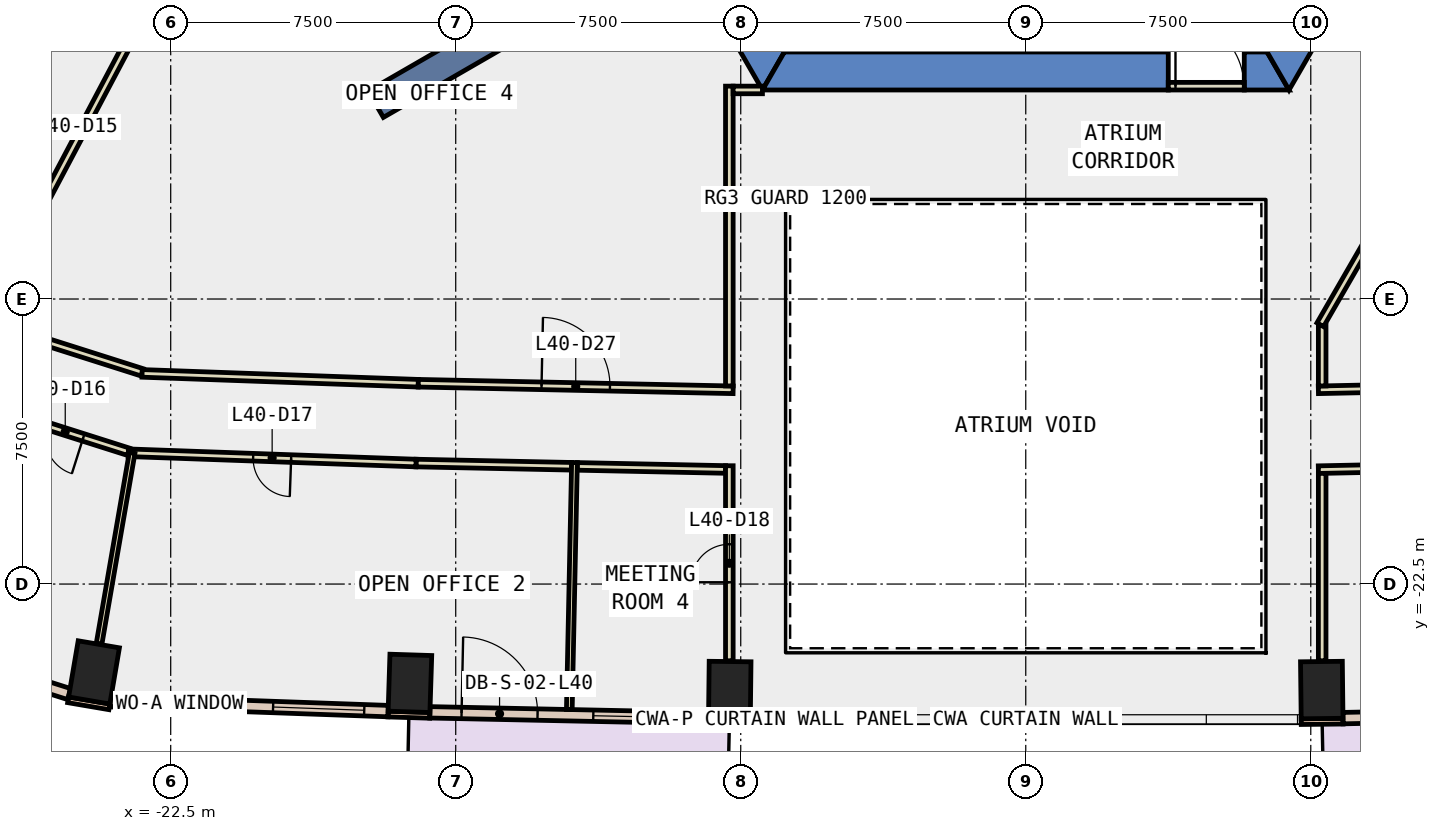
"""IFC4 building model, lengths in metres.
Left out: names, types, materials, properties, quantities, classifications, styles, units other than length and angle.
Written with IfcOpenShell. Run it as: python <this file> out.ifc"""

import sys

from ifc_helpers import new_model, si_unit, direction, frame, frame_2d, origin, origin_2d, place, context, subcontext, project, spatial, polyline, rectangle, outline, extrude, element, fill, save


model = new_model("IFC4")
c1 = context("Model", 3, precision=1e-05, world=origin(), true_north=direction((0.0, 1.0)))
c2 = subcontext(c1, "Body", "Model", "MODEL_VIEW")
j1 = project(units=[si_unit("LENGTHUNIT", "METRE"), si_unit("PLANEANGLEUNIT", "RADIAN")], contexts=[c1])
p1 = place(None, origin())
s1 = spatial("IfcSite", under=j1, at=p1, CompositionType="ELEMENT")
p2 = place(p1, origin())
s2 = spatial("IfcBuilding", under=s1, at=p2, CompositionType="ELEMENT")
p3 = place(p2, frame((0.0, 0.0, 180.2)))
s3 = spatial("IfcBuildingStorey", under=s2, at=p3, CompositionType="ELEMENT", Elevation=180.2)
for number, where, z_axis, x_axis in (
    (1, (-24.518, -24.825, -0.4), (0.0, 0.0, 1.0), (-0.986, 0.168, 0.0)),
    (2, (-16.205, -25.113, -0.4), (0.0, 0.0, 1.0), (-0.999, 0.032, 0.0)),
    (3, (-7.789, -25.289, -0.4), (0.0, 0.0, 1.0), (-1.0, 0.012, 0.0)),
    (4, (7.789, -25.289, -0.4), (0.0, 0.0, 1.0), (1.0, 0.012, 0.0)),
):
    element("IfcColumn", number, at=place(p3, frame(where, z_axis=z_axis, x_axis=x_axis)), inside=s3, PredefinedType="COLUMN", context=c2, shape_type="SweptSolid", body=[
        extrude(rectangle(XDim=1.1, YDim=1.5, at=origin_2d()), origin(), (0.0, 0.0, 1.0), 4.0),
    ])
p4 = place(p3, frame((0.0, 0.0, -0.4)))
e5 = element("IfcWall", 5, at=p4, inside=s3, PredefinedType="SHEAR", context=c2, shape_type="SweptSolid", body=[
    extrude(outline(polyline([(-13.856, 2.5), (-6.928, -9.5), (-6.351, -8.5), (-12.702, 2.5), (-13.856, 2.5)])), origin(), (0.0, 0.0, 1.0), 4.0),
])
p5 = place(p3, frame((0.0, 0.0, -0.4)))
e6 = element("IfcWall", 6, at=p5, inside=s3, PredefinedType="SHEAR", context=c2, shape_type="SweptSolid", body=[
    extrude(outline(polyline([(3.75, -9.5), (3.75, -8.5), (-6.351, -8.5), (-6.928, -9.5), (3.75, -9.5)])), origin(), (0.0, 0.0, 1.0), 4.0),
])
p6 = place(p3, frame((0.0, 0.0, -0.4)))
e7 = element("IfcWall", 7, at=p6, inside=s3, PredefinedType="SHEAR", context=c2, shape_type="SweptSolid", body=[
    extrude(outline(polyline([(5.75, -8.5), (5.75, -9.5), (6.928, -9.5), (6.351, -8.5), (5.75, -8.5)])), origin(), (0.0, 0.0, 1.0), 4.0),
])
p7 = place(p3, frame((0.0, 0.0, -0.4)))
e8 = element("IfcWall", 8, at=p7, inside=s3, PredefinedType="SHEAR", context=c2, shape_type="SweptSolid", body=[
    extrude(outline(polyline([(8.117, -7.44), (7.252, -6.94), (6.351, -8.5), (6.928, -9.5), (8.117, -7.44)])), origin(), (0.0, 0.0, 1.0), 4.0),
])
p8 = place(p3, frame((-9.31, -5.375, -0.4), z_axis=(0.0, 0.0, 1.0), x_axis=(-0.866017533419, -0.500013631625, 0.0)))
e9 = element("IfcWall", 9, at=p8, inside=s3, PredefinedType="SHEAR", context=c2, shape_type="SweptSolid", body=[
    extrude(rectangle(XDim=9.0, YDim=0.8, at=frame_2d((4.5, 0.0))), origin(), (0.0, 0.0, 1.0), 4.0),
])
p9 = place(p3, frame((-25.199, -25.546, 0.0), z_axis=(0.0, 0.0, 1.0), x_axis=(0.985763338892, -0.168138751323, 0.0)))
e10 = element("IfcWall", 10, at=p9, inside=s3, PredefinedType="STANDARD", context=c2, shape_type="SweptSolid", body=[
    extrude(rectangle(XDim=1.101, YDim=0.15, at=frame_2d((0.55, 0.0))), origin(), (0.0, 0.0, 1.0), 3.6),
])
p10 = place(p3, frame((-16.781, -25.921, 0.0), z_axis=(0.0, 0.0, 1.0), x_axis=(0.99951682968, -0.031082264806, 0.0)))
e11 = element("IfcWall", 11, at=p10, inside=s3, PredefinedType="STANDARD", context=c2, shape_type="SweptSolid", body=[
    extrude(rectangle(XDim=1.1, YDim=0.15, at=frame_2d((0.55, 0.0))), origin(), (0.0, 0.0, 1.0), 3.6),
])
for number, where, z_axis, x_axis in (
    (12, (-8.349, -26.108, 0.0), (0.0, 0.0, 1.0), (1.0, -0.011, 0.0)),
    (13, (7.249, -26.12, 0.0), (0.0, 0.0, 1.0), (1.0, 0.011, 0.0)),
):
    element("IfcWall", number, at=place(p3, frame(where, z_axis=z_axis, x_axis=x_axis)), inside=s3, PredefinedType="STANDARD", context=c2, shape_type="SweptSolid", body=[
        extrude(rectangle(XDim=1.1, YDim=0.15, at=frame_2d((0.55, 0.0))), origin(), (0.0, 0.0, 1.0), 3.6),
    ])
p11 = place(p3, frame((-24.09, -25.583, 0.0), z_axis=(0.0, 0.0, 1.0), x_axis=(0.999368368263, -0.035536805082, 0.0)))
e14 = element("IfcWall", 14, at=p11, inside=s3, PredefinedType="STANDARD", context=c2, shape_type="SweptSolid", body=[
    extrude(rectangle(XDim=7.317, YDim=0.3, at=frame_2d((3.658, 0.0))), origin(), (0.0, 0.0, 1.0), 3.6),
])
p12 = place(p11, frame((0.629, 0.0, 0.9)))
e15 = element("IfcOpeningElement", 15, at=p12, cuts=e14, PredefinedType="OPENING", context=c2, shape_type="SweptSolid", body=[
    extrude(rectangle(XDim=2.4, YDim=2.6, at=frame_2d((1.2, 1.3))), frame((0.0, 0.16, 0.0), z_axis=(0.0, -1.0, 0.0), x_axis=(1.0, 0.0, 0.0)), (0.0, 0.0, 1.0), 0.32),
])
p13 = place(p11, frame((4.287, 0.0, 0.9)))
e16 = element("IfcOpeningElement", 16, at=p13, cuts=e14, PredefinedType="OPENING", context=c2, shape_type="SweptSolid", body=[
    extrude(rectangle(XDim=2.4, YDim=2.6, at=frame_2d((1.2, 1.3))), frame((0.0, 0.16, 0.0), z_axis=(0.0, -1.0, 0.0), x_axis=(1.0, 0.0, 0.0)), (0.0, 0.0, 1.0), 0.32),
])
p14 = place(p3, frame((-15.68, -25.875, 0.0), z_axis=(0.0, 0.0, 1.0), x_axis=(0.999782189413, -0.020870403275, 0.0)))
e17 = element("IfcWall", 17, at=p14, inside=s3, PredefinedType="STANDARD", context=c2, shape_type="SweptSolid", body=[
    extrude(rectangle(XDim=7.335, YDim=0.3, at=frame_2d((3.667, 0.0))), origin(), (0.0, 0.0, 1.0), 3.6),
])
p15 = place(p14, frame((0.834, 0.0, 0.0)))
e18 = element("IfcOpeningElement", 18, at=p15, cuts=e17, PredefinedType="OPENING", context=c2, shape_type="SweptSolid", body=[
    extrude(rectangle(XDim=2.0, YDim=2.4, at=frame_2d((1.0, 1.2))), frame((0.0, 0.16, 0.0), z_axis=(0.0, -1.0, 0.0), x_axis=(1.0, 0.0, 0.0)), (0.0, 0.0, 1.0), 0.32),
])
p16 = place(p14, frame((4.301, 0.0, 0.9)))
e19 = element("IfcOpeningElement", 19, at=p16, cuts=e17, PredefinedType="OPENING", context=c2, shape_type="SweptSolid", body=[
    extrude(rectangle(XDim=2.4, YDim=2.6, at=frame_2d((1.2, 1.3))), frame((0.0, 0.16, 0.0), z_axis=(0.0, -1.0, 0.0), x_axis=(1.0, 0.0, 0.0)), (0.0, 0.0, 1.0), 0.32),
])
p17 = place(p3, frame((8.347, -26.028, 0.0), z_axis=(0.0, 0.0, 1.0), x_axis=(0.999782189413, 0.020870403275, 0.0)))
e20 = element("IfcWall", 20, at=p17, inside=s3, PredefinedType="STANDARD", context=c2, shape_type="SweptSolid", body=[
    extrude(rectangle(XDim=7.335, YDim=0.3, at=frame_2d((3.667, 0.0))), origin(), (0.0, 0.0, 1.0), 3.6),
])
p18 = place(p17, frame((0.834, 0.0, 0.0)))
e21 = element("IfcOpeningElement", 21, at=p18, cuts=e20, PredefinedType="OPENING", context=c2, shape_type="SweptSolid", body=[
    extrude(rectangle(XDim=2.0, YDim=2.4, at=frame_2d((1.0, 1.2))), frame((0.0, 0.16, 0.0), z_axis=(0.0, -1.0, 0.0), x_axis=(1.0, 0.0, 0.0)), (0.0, 0.0, 1.0), 0.32),
])
p19 = place(p17, frame((4.301, 0.0, 0.9)))
e22 = element("IfcOpeningElement", 22, at=p19, cuts=e20, PredefinedType="OPENING", context=c2, shape_type="SweptSolid", body=[
    extrude(rectangle(XDim=2.4, YDim=2.6, at=frame_2d((1.2, 1.3))), frame((0.0, 0.16, 0.0), z_axis=(0.0, -1.0, 0.0), x_axis=(1.0, 0.0, 0.0)), (0.0, 0.0, 1.0), 0.32),
])
p20 = place(p3, frame((-29.662, -23.97, 0.0), z_axis=(0.0, 0.0, 1.0), x_axis=(0.953145379857, -0.302512619337, 0.0)))
e23 = element("IfcWall", 23, at=p20, inside=s3, PredefinedType="STANDARD", context=c2, shape_type="SweptSolid", body=[
    extrude(rectangle(XDim=4.711, YDim=0.3, at=frame_2d((2.355, 0.0))), origin(), (0.0, 0.0, 1.0), 3.6),
])
p21 = place(p20, frame((1.655, 0.0, 0.9)))
e24 = element("IfcOpeningElement", 24, at=p21, cuts=e23, PredefinedType="OPENING", context=c2, shape_type="SweptSolid", body=[
    extrude(rectangle(XDim=1.4, YDim=2.6, at=frame_2d((0.7, 1.3))), frame((0.0, 0.16, 0.0), z_axis=(0.0, -1.0, 0.0), x_axis=(1.0, 0.0, 0.0)), (0.0, 0.0, 1.0), 0.32),
])
p22 = place(p3, frame((7.7, -17.389, 0.0), z_axis=(0.0, 0.0, 1.0), x_axis=(0.999782442794, 0.020858261713, 0.0)))
e25 = element("IfcWall", 25, at=p22, inside=s3, PredefinedType="PARTITIONING", context=c2, shape_type="SweptSolid", body=[
    extrude(rectangle(XDim=8.287, YDim=0.2, at=frame_2d((4.144, 0.0))), origin(), (0.0, 0.0, 1.0), 3.6),
])
p23 = place(p22, frame((3.644, 0.0, 0.0)))
e26 = element("IfcOpeningElement", 26, at=p23, cuts=e25, PredefinedType="OPENING", context=c2, shape_type="SweptSolid", body=[
    extrude(rectangle(XDim=1.0, YDim=2.1, at=frame_2d((0.5, 1.05))), frame((0.0, 0.11, 0.0), z_axis=(0.0, -1.0, 0.0), x_axis=(1.0, 0.0, 0.0)), (0.0, 0.0, 1.0), 0.22),
])
p24 = place(p3, frame((-22.888, -6.878, 0.0), z_axis=(0.0, 0.0, 1.0), x_axis=(-0.467533790284, -0.883975200411, 0.0)))
e27 = element("IfcWall", 27, at=p24, inside=s3, PredefinedType="PARTITIONING", context=c2, shape_type="SweptSolid", body=[
    extrude(rectangle(XDim=6.656, YDim=0.2, at=frame_2d((3.328, 0.0))), origin(), (0.0, 0.0, 1.0), 3.6),
])
p25 = place(p3, frame((-25.864, -16.1, 0.0), z_axis=(0.0, 0.0, 1.0), x_axis=(0.953158072423, -0.302472625167, 0.0)))
e28 = element("IfcWall", 28, at=p25, inside=s3, PredefinedType="PARTITIONING", context=c2, shape_type="SweptSolid", body=[
    extrude(rectangle(XDim=2.743, YDim=0.2, at=frame_2d((1.372, 0.0))), origin(), (0.0, 0.0, 1.0), 3.6),
])
p26 = place(p3, frame((-23.253, -16.957, 0.0), z_axis=(0.0, 0.0, 1.0), x_axis=(0.999365460355, -0.035618487468, 0.0)))
e29 = element("IfcWall", 29, at=p26, inside=s3, PredefinedType="PARTITIONING", context=c2, shape_type="SweptSolid", body=[
    extrude(rectangle(XDim=7.272, YDim=0.2, at=frame_2d((3.636, 0.0))), origin(), (0.0, 0.0, 1.0), 3.6),
])
p27 = place(p3, frame((-15.985, -17.216, 0.0), z_axis=(0.0, 0.0, 1.0), x_axis=(0.999782442794, -0.020858261713, 0.0)))
e30 = element("IfcWall", 30, at=p27, inside=s3, PredefinedType="PARTITIONING", context=c2, shape_type="SweptSolid", body=[
    extrude(rectangle(XDim=8.287, YDim=0.2, at=frame_2d((4.144, 0.0))), origin(), (0.0, 0.0, 1.0), 3.6),
])
p28 = place(p27, frame((3.244, 0.0, 0.0)))
e31 = element("IfcOpeningElement", 31, at=p28, cuts=e30, PredefinedType="OPENING", context=c2, shape_type="SweptSolid", body=[
    extrude(rectangle(XDim=1.8, YDim=2.1, at=frame_2d((0.9, 1.05))), frame((0.0, 0.11, 0.0), z_axis=(0.0, -1.0, 0.0), x_axis=(1.0, 0.0, 0.0)), (0.0, 0.0, 1.0), 0.22),
])
p29 = place(p3, frame((16.045, -19.316, 0.0), z_axis=(0.0, 0.0, 1.0), x_axis=(-0.99978251073, -0.020855005124, 0.0)))
e32 = element("IfcWall", 32, at=p29, inside=s3, PredefinedType="PARTITIONING", context=c2, shape_type="SweptSolid", body=[
    extrude(rectangle(XDim=8.347, YDim=0.2, at=frame_2d((4.173, 0.0))), origin(), (0.0, 0.0, 1.0), 3.6),
])
p30 = place(p29, frame((3.673, 0.0, 0.0)))
e33 = element("IfcOpeningElement", 33, at=p30, cuts=e32, PredefinedType="OPENING", context=c2, shape_type="SweptSolid", body=[
    extrude(rectangle(XDim=1.0, YDim=2.1, at=frame_2d((0.5, 1.05))), frame((0.0, 0.11, 0.0), z_axis=(0.0, -1.0, 0.0), x_axis=(1.0, 0.0, 0.0)), (0.0, 0.0, 1.0), 0.22),
])
p31 = place(p3, frame((-26.376, -8.982, 0.0), z_axis=(0.0, 0.0, 1.0), x_axis=(0.467529077139, 0.883977693174, 0.0)))
e34 = element("IfcWall", 34, at=p31, inside=s3, PredefinedType="PARTITIONING", context=c2, shape_type="SweptSolid", body=[
    extrude(rectangle(XDim=3.503, YDim=0.2, at=frame_2d((1.752, 0.0))), origin(), (0.0, 0.0, 1.0), 3.6),
])
p32 = place(p3, frame((-23.61, -19.019, 0.0), z_axis=(0.0, 0.0, 1.0), x_axis=(-0.953121068097, 0.302589209243, 0.0)))
e35 = element("IfcWall", 35, at=p32, inside=s3, PredefinedType="PARTITIONING", context=c2, shape_type="SweptSolid", body=[
    extrude(rectangle(XDim=3.494, YDim=0.2, at=frame_2d((1.747, 0.0))), origin(), (0.0, 0.0, 1.0), 3.6),
])
p33 = place(p32, frame((1.247, 0.0, 0.0)))
e36 = element("IfcOpeningElement", 36, at=p33, cuts=e35, PredefinedType="OPENING", context=c2, shape_type="SweptSolid", body=[
    extrude(rectangle(XDim=1.0, YDim=2.1, at=frame_2d((0.5, 1.05))), frame((0.0, 0.11, 0.0), z_axis=(0.0, -1.0, 0.0), x_axis=(1.0, 0.0, 0.0)), (0.0, 0.0, 1.0), 0.22),
])
p34 = place(p3, frame((-11.952, -19.401, 0.0), z_axis=(0.0, 0.0, 1.0), x_axis=(-0.999784632057, 0.020753060063, 0.0)))
e37 = element("IfcWall", 37, at=p34, inside=s3, PredefinedType="PARTITIONING", context=c2, shape_type="SweptSolid", body=[
    extrude(rectangle(XDim=4.094, YDim=0.2, at=frame_2d((2.047, 0.0))), origin(), (0.0, 0.0, 1.0), 3.6),
])
p35 = place(p3, frame((-16.045, -19.316, 0.0), z_axis=(0.0, 0.0, 1.0), x_axis=(-0.999359853626, 0.035775451915, 0.0)))
e38 = element("IfcWall", 38, at=p35, inside=s3, PredefinedType="PARTITIONING", context=c2, shape_type="SweptSolid", body=[
    extrude(rectangle(XDim=7.575, YDim=0.2, at=frame_2d((3.788, 0.0))), origin(), (0.0, 0.0, 1.0), 3.6),
])
p36 = place(p35, frame((3.288, 0.0, 0.0)))
e39 = element("IfcOpeningElement", 39, at=p36, cuts=e38, PredefinedType="OPENING", context=c2, shape_type="SweptSolid", body=[
    extrude(rectangle(XDim=1.0, YDim=2.1, at=frame_2d((0.5, 1.05))), frame((0.0, 0.11, 0.0), z_axis=(0.0, -1.0, 0.0), x_axis=(1.0, 0.0, 0.0)), (0.0, 0.0, 1.0), 0.22),
])
p37 = place(p3, frame((-7.9, -19.485, 0.0), z_axis=(0.0, 0.0, 1.0), x_axis=(-0.999784330337, 0.020767590419, 0.0)))
e40 = element("IfcWall", 40, at=p37, inside=s3, PredefinedType="PARTITIONING", context=c2, shape_type="SweptSolid", body=[
    extrude(rectangle(XDim=3.903, YDim=0.2, at=frame_2d((1.951, 0.0))), origin(), (0.0, 0.0, 1.0), 3.6),
])
p38 = place(p3, frame((7.8, -15.69, 0.0), z_axis=(0.0, 0.0, 1.0), x_axis=(0.0, -1.0, 0.0)))
e41 = element("IfcWall", 41, at=p38, inside=s3, PredefinedType="PARTITIONING", context=c2, shape_type="SweptSolid", body=[
    extrude(rectangle(XDim=1.597, YDim=0.2, at=frame_2d((0.799, 0.0))), origin(), (0.0, 0.0, 1.0), 3.6),
])
p39 = place(p3, frame((-7.8, -17.287, 0.0), z_axis=(0.0, 0.0, 1.0), x_axis=(0.0, 1.0, 0.0)))
e42 = element("IfcWall", 42, at=p39, inside=s3, PredefinedType="PARTITIONING", context=c2, shape_type="SweptSolid", body=[
    extrude(rectangle(XDim=7.888, YDim=0.2, at=frame_2d((3.944, 0.0))), origin(), (0.0, 0.0, 1.0), 3.6),
])
p40 = place(p3, frame((-7.7, -9.499, 0.0), z_axis=(0.0, 0.0, 1.0), x_axis=(1.0, 0.0, 0.0)))
e43 = element("IfcWall", 43, at=p40, inside=s3, PredefinedType="PARTITIONING", context=c2, shape_type="SweptSolid", body=[
    extrude(rectangle(XDim=0.771, YDim=0.2, at=frame_2d((0.385, 0.0))), origin(), (0.0, 0.0, 1.0), 3.6),
])
p41 = place(p3, frame((7.8, -19.588, 0.0), z_axis=(0.0, 0.0, 1.0), x_axis=(0.0, -1.0, 0.0)))
e44 = element("IfcWall", 44, at=p41, inside=s3, PredefinedType="PARTITIONING", context=c2, shape_type="SweptSolid", body=[
    extrude(rectangle(XDim=4.931, YDim=0.2, at=frame_2d((2.466, 0.0))), origin(), (0.0, 0.0, 1.0), 3.6),
])
p42 = place(p3, frame((-7.8, -24.519, 0.0), z_axis=(0.0, 0.0, 1.0), x_axis=(0.0, 1.0, 0.0)))
e45 = element("IfcWall", 45, at=p42, inside=s3, PredefinedType="PARTITIONING", context=c2, shape_type="SweptSolid", body=[
    extrude(rectangle(XDim=5.132, YDim=0.2, at=frame_2d((2.566, 0.0))), origin(), (0.0, 0.0, 1.0), 3.6),
])
p43 = place(p42, frame((2.066, 0.0, 0.0)))
e46 = element("IfcOpeningElement", 46, at=p43, cuts=e45, PredefinedType="OPENING", context=c2, shape_type="SweptSolid", body=[
    extrude(rectangle(XDim=1.0, YDim=2.1, at=frame_2d((0.5, 1.05))), frame((0.0, 0.11, 0.0), z_axis=(0.0, -1.0, 0.0), x_axis=(1.0, 0.0, 0.0)), (0.0, 0.0, 1.0), 0.22),
])
p44 = place(p3, frame((12.476, -7.491, 0.0), z_axis=(0.0, 0.0, 1.0), x_axis=(-0.499989258007, -0.866031605588, 0.0)))
e47 = element("IfcWall", 47, at=p44, inside=s3, PredefinedType="PARTITIONING", context=c2, shape_type="SweptSolid", body=[
    extrude(rectangle(XDim=9.452, YDim=0.2, at=frame_2d((4.726, 0.0))), origin(), (0.0, 0.0, 1.0), 3.6),
])
p45 = place(p3, frame((-23.515, -19.049, 0.0), z_axis=(0.0, 0.0, 1.0), x_axis=(-0.170669435204, -0.985328343187, 0.0)))
e48 = element("IfcWall", 48, at=p45, inside=s3, PredefinedType="PARTITIONING", context=c2, shape_type="SweptSolid", body=[
    extrude(rectangle(XDim=5.093, YDim=0.15, at=frame_2d((2.546, 0.0))), origin(), (0.0, 0.0, 1.0), 3.6),
])
p46 = place(p3, frame((-11.875, -19.303, 0.0), z_axis=(0.0, 0.0, 1.0), x_axis=(-0.020922680752, -0.999781096756, 0.0)))
e49 = element("IfcWall", 49, at=p46, inside=s3, PredefinedType="PARTITIONING", context=c2, shape_type="SweptSolid", body=[
    extrude(rectangle(XDim=6.5, YDim=0.15, at=frame_2d((3.25, 0.0))), origin(), (0.0, 0.0, 1.0), 3.6),
])
p47 = place(p3, frame((3.75, -9.4, 0.0), z_axis=(0.0, 0.0, 1.0), x_axis=(1.0, 0.0, 0.0)))
e50 = element("IfcWall", 50, at=p47, inside=s3, PredefinedType="PARTITIONING", context=c2, shape_type="SweptSolid", body=[
    extrude(rectangle(XDim=2.0, YDim=0.2, at=frame_2d((1.0, 0.0))), origin(), (0.0, 0.0, 1.0), 2.4),
])
p48 = place(p47, frame((0.19, 0.0, 0.0)))
e51 = element("IfcOpeningElement", 51, at=p48, cuts=e50, PredefinedType="OPENING", context=c2, shape_type="SweptSolid", body=[
    extrude(rectangle(XDim=1.8, YDim=2.1, at=frame_2d((0.9, 1.05))), frame((0.0, 0.11, 0.0), z_axis=(0.0, -1.0, 0.0), x_axis=(1.0, 0.0, 0.0)), (0.0, 0.0, 1.0), 0.22),
])
p49 = place(p12, origin())
e52 = element("IfcWindow", 52, at=p49, inside=s3, PartitioningType="SINGLE_PANEL", PredefinedType="WINDOW", context=c2, shape_type="SweptSolid", body=[
    extrude(rectangle(XDim=2.4, YDim=2.6, at=frame_2d((1.2, 1.3))), frame((0.0, 0.03, 0.0), z_axis=(0.0, -1.0, 0.0), x_axis=(1.0, 0.0, 0.0)), (0.0, 0.0, 1.0), 0.06),
])
fill(e15, e52)
p50 = place(p13, origin())
e53 = element("IfcWindow", 53, at=p50, inside=s3, PartitioningType="SINGLE_PANEL", PredefinedType="WINDOW", context=c2, shape_type="SweptSolid", body=[
    extrude(rectangle(XDim=2.4, YDim=2.6, at=frame_2d((1.2, 1.3))), frame((0.0, 0.03, 0.0), z_axis=(0.0, -1.0, 0.0), x_axis=(1.0, 0.0, 0.0)), (0.0, 0.0, 1.0), 0.06),
])
fill(e16, e53)
p51 = place(p15, origin())
e54 = element("IfcDoor", 54, at=p51, inside=s3, OperationType="SLIDING_TO_LEFT", PredefinedType="DOOR", context=c2, shape_type="SweptSolid", body=[
    extrude(rectangle(XDim=2.0, YDim=2.4, at=frame_2d((1.0, 1.2))), frame((0.0, 0.025, 0.0), z_axis=(0.0, -1.0, 0.0), x_axis=(1.0, 0.0, 0.0)), (0.0, 0.0, 1.0), 0.05),
])
fill(e18, e54)
p52 = place(p16, origin())
e55 = element("IfcWindow", 55, at=p52, inside=s3, PartitioningType="SINGLE_PANEL", PredefinedType="WINDOW", context=c2, shape_type="SweptSolid", body=[
    extrude(rectangle(XDim=2.4, YDim=2.6, at=frame_2d((1.2, 1.3))), frame((0.0, 0.03, 0.0), z_axis=(0.0, -1.0, 0.0), x_axis=(1.0, 0.0, 0.0)), (0.0, 0.0, 1.0), 0.06),
])
fill(e19, e55)
p53 = place(p33, origin())
e56 = element("IfcDoor", 56, at=p53, inside=s3, OperationType="SINGLE_SWING_LEFT", PredefinedType="DOOR", context=c2, shape_type="SweptSolid", body=[
    extrude(rectangle(XDim=1.0, YDim=2.1, at=frame_2d((0.5, 1.05))), frame((0.0, 0.025, 0.0), z_axis=(0.0, -1.0, 0.0), x_axis=(1.0, 0.0, 0.0)), (0.0, 0.0, 1.0), 0.05),
])
fill(e36, e56)
p54 = place(p36, origin())
e57 = element("IfcDoor", 57, at=p54, inside=s3, OperationType="SINGLE_SWING_LEFT", PredefinedType="DOOR", context=c2, shape_type="SweptSolid", body=[
    extrude(rectangle(XDim=1.0, YDim=2.1, at=frame_2d((0.5, 1.05))), frame((0.0, 0.025, 0.0), z_axis=(0.0, -1.0, 0.0), x_axis=(1.0, 0.0, 0.0)), (0.0, 0.0, 1.0), 0.05),
])
fill(e39, e57)
p55 = place(p43, origin())
e58 = element("IfcDoor", 58, at=p55, inside=s3, OperationType="SINGLE_SWING_LEFT", PredefinedType="DOOR", context=c2, shape_type="SweptSolid", body=[
    extrude(rectangle(XDim=1.0, YDim=2.1, at=frame_2d((0.5, 1.05))), frame((0.0, 0.025, 0.0), z_axis=(0.0, -1.0, 0.0), x_axis=(1.0, 0.0, 0.0)), (0.0, 0.0, 1.0), 0.05),
])
fill(e46, e58)
p56 = place(p28, origin())
e59 = element("IfcDoor", 59, at=p56, inside=s3, OperationType="DOUBLE_DOOR_SINGLE_SWING", PredefinedType="DOOR", context=c2, shape_type="SweptSolid", body=[
    extrude(rectangle(XDim=1.8, YDim=2.1, at=frame_2d((0.9, 1.05))), frame((0.0, 0.025, 0.0), z_axis=(0.0, -1.0, 0.0), x_axis=(1.0, 0.0, 0.0)), (0.0, 0.0, 1.0), 0.05),
])
fill(e31, e59)
p57 = place(p48, origin())
e60 = element("IfcDoor", 60, at=p57, inside=s3, OperationType="DOUBLE_DOOR_SINGLE_SWING", PredefinedType="DOOR", context=c2, shape_type="SweptSolid", body=[
    extrude(rectangle(XDim=1.8, YDim=2.1, at=frame_2d((0.9, 1.05))), frame((0.0, 0.025, 0.0), z_axis=(0.0, -1.0, 0.0), x_axis=(1.0, 0.0, 0.0)), (0.0, 0.0, 1.0), 0.05),
])
fill(e51, e60)
save(model, sys.argv[1])
